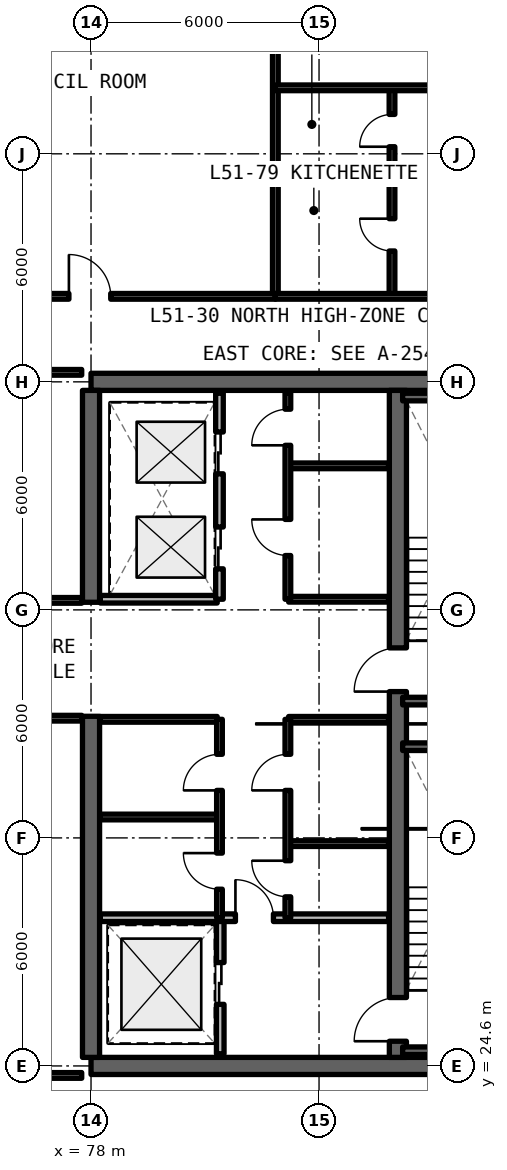
"""IFC4 building model, lengths in metres.
Left out: names, types, materials, properties, quantities, classifications, styles, units other than length and angle.
Written with IfcOpenShell. Run it as: python <this file> out.ifc"""

import sys

from ifc_helpers import new_model, si_unit, direction, frame, frame_2d, origin, place, context, subcontext, project, spatial, rectangle, extrude, element, fill, save


model = new_model("IFC4")
c1 = context("Model", 3, precision=1e-05, world=origin(), true_north=direction((0.0, 1.0)))
c2 = subcontext(c1, "Body", "Model", "MODEL_VIEW")
j1 = project(units=[si_unit("LENGTHUNIT", "METRE"), si_unit("PLANEANGLEUNIT", "RADIAN")], contexts=[c1])
p1 = place(None, origin())
s1 = spatial("IfcSite", under=j1, at=p1, CompositionType="ELEMENT")
p2 = place(p1, origin())
s2 = spatial("IfcBuilding", under=s1, at=p2, CompositionType="ELEMENT")
p3 = place(p2, frame((0.0, 0.0, 185.13)))
s3 = spatial("IfcBuildingStorey", under=s2, at=p3, CompositionType="ELEMENT", Elevation=185.13)
for number, where, z_axis, x_axis in (
    (1, (78.0, 24.6, 0.0), (0.0, 0.0, 1.0), (1.0, 0.0, 0.0)),
    (2, (90.0, 42.6, 0.0), (0.0, 0.0, 1.0), (-1.0, 0.0, 0.0)),
):
    element("IfcWall", number, at=place(p3, frame(where, z_axis=z_axis, x_axis=x_axis)), inside=s3, PredefinedType="SHEAR", context=c2, shape_type="SweptSolid", body=[
        extrude(rectangle(XDim=12.0, YDim=0.45, at=frame_2d((6.0, 0.0))), origin(), (0.0, 0.0, 1.0), 3.3),
    ])
p4 = place(p3, frame((78.0, 24.825, 0.0), z_axis=(0.0, 0.0, 1.0), x_axis=(0.0, 1.0, 0.0)))
e3 = element("IfcWall", 3, at=p4, inside=s3, PredefinedType="SHEAR", context=c2, shape_type="SweptSolid", body=[
    extrude(rectangle(XDim=8.975, YDim=0.45, at=frame_2d((4.488, 0.0))), origin(), (0.0, 0.0, 1.0), 3.3),
])
p5 = place(p3, frame((78.0, 36.8, 0.0), z_axis=(0.0, 0.0, 1.0), x_axis=(0.0, 1.0, 0.0)))
e4 = element("IfcWall", 4, at=p5, inside=s3, PredefinedType="SHEAR", context=c2, shape_type="SweptSolid", body=[
    extrude(rectangle(XDim=5.575, YDim=0.45, at=frame_2d((2.788, 0.0))), origin(), (0.0, 0.0, 1.0), 3.3),
])
p6 = place(p3, frame((86.075, 24.825, 0.0), z_axis=(0.0, 0.0, 1.0), x_axis=(0.0, 1.0, 0.0)))
e5 = element("IfcWall", 5, at=p6, inside=s3, PredefinedType="SHEAR", context=c2, shape_type="SweptSolid", body=[
    extrude(rectangle(XDim=17.55, YDim=0.45, at=frame_2d((8.775, 0.0))), origin(), (0.0, 0.0, 1.0), 3.3),
])
p7 = place(p6, frame((0.425, 0.0, 0.0)))
e6 = element("IfcOpeningElement", 6, at=p7, cuts=e5, PredefinedType="OPENING", context=c2, shape_type="SweptSolid", body=[
    extrude(rectangle(XDim=1.15, YDim=2.15, at=frame_2d((0.575, 1.075))), frame((0.0, 0.235, 0.0), z_axis=(0.0, -1.0, 0.0), x_axis=(1.0, 0.0, 0.0)), (0.0, 0.0, 1.0), 0.47),
])
p8 = place(p6, frame((9.625, 0.0, 0.0)))
e7 = element("IfcOpeningElement", 7, at=p8, cuts=e5, PredefinedType="OPENING", context=c2, shape_type="SweptSolid", body=[
    extrude(rectangle(XDim=1.15, YDim=2.15, at=frame_2d((0.575, 1.075))), frame((0.0, 0.235, 0.0), z_axis=(0.0, -1.0, 0.0), x_axis=(1.0, 0.0, 0.0)), (0.0, 0.0, 1.0), 0.47),
])
p9 = place(p3, frame((81.4, 24.92, 0.0), z_axis=(0.0, 0.0, 1.0), x_axis=(0.0, 1.0, 0.0)))
e8 = element("IfcWall", 8, at=p9, inside=s3, PredefinedType="SOLIDWALL", context=c2, shape_type="SweptSolid", body=[
    extrude(rectangle(XDim=3.58, YDim=0.2, at=frame_2d((1.79, 0.0))), origin(), (0.0, 0.0, 1.0), 2.35),
])
p10 = place(p9, frame((1.3, 0.0, 0.0)))
e9 = element("IfcOpeningElement", 9, at=p10, cuts=e8, PredefinedType="OPENING", context=c2, shape_type="SweptSolid", body=[
    extrude(rectangle(XDim=1.1, YDim=2.2, at=frame_2d((0.55, 1.1))), frame((0.0, 0.11, 0.0), z_axis=(0.0, -1.0, 0.0), x_axis=(1.0, 0.0, 0.0)), (0.0, 0.0, 1.0), 0.22),
])
p11 = place(p3, frame((78.245, 28.5, 0.0), z_axis=(0.0, 0.0, 1.0), x_axis=(1.0, 0.0, 0.0)))
e10 = element("IfcWall", 10, at=p11, inside=s3, PredefinedType="SOLIDWALL", context=c2, shape_type="SweptSolid", body=[
    extrude(rectangle(XDim=7.585, YDim=0.2, at=frame_2d((3.792, 0.0))), origin(), (0.0, 0.0, 1.0), 2.35),
])
p12 = place(p11, frame((3.555, 0.0, 0.0)))
e11 = element("IfcOpeningElement", 11, at=p12, cuts=e10, PredefinedType="OPENING", context=c2, shape_type="SweptSolid", body=[
    extrude(rectangle(XDim=1.0, YDim=2.15, at=frame_2d((0.5, 1.075))), frame((0.0, 0.11, 0.0), z_axis=(0.0, -1.0, 0.0), x_axis=(1.0, 0.0, 0.0)), (0.0, 0.0, 1.0), 0.22),
])
for number, where, z_axis, x_axis in (
    (12, (83.2, 30.45, 0.0), (0.0, 0.0, 1.0), (1.0, 0.0, 0.0)),
    (13, (83.2, 33.72, 0.0), (0.0, 0.0, 1.0), (1.0, 0.0, 0.0)),
):
    element("IfcWall", number, at=place(p3, frame(where, z_axis=z_axis, x_axis=x_axis)), inside=s3, PredefinedType="SOLIDWALL", context=c2, shape_type="SweptSolid", body=[
        extrude(rectangle(XDim=2.63, YDim=0.15, at=frame_2d((1.315, 0.0))), origin(), (0.0, 0.0, 1.0), 2.35),
    ])
p13 = place(p3, frame((83.18, 28.5, 0.0), z_axis=(0.0, 0.0, 1.0), x_axis=(0.0, 1.0, 0.0)))
e14 = element("IfcWall", 14, at=p13, inside=s3, PredefinedType="SOLIDWALL", context=c2, shape_type="SweptSolid", body=[
    extrude(rectangle(XDim=5.22, YDim=0.15, at=frame_2d((2.61, 0.0))), origin(), (0.0, 0.0, 1.0), 2.35),
])
p14 = place(p13, frame((0.55, 0.0, 0.0)))
e15 = element("IfcOpeningElement", 15, at=p14, cuts=e14, PredefinedType="OPENING", context=c2, shape_type="SweptSolid", body=[
    extrude(rectangle(XDim=0.95, YDim=2.15, at=frame_2d((0.475, 1.075))), frame((0.0, 0.085, 0.0), z_axis=(0.0, -1.0, 0.0), x_axis=(1.0, 0.0, 0.0)), (0.0, 0.0, 1.0), 0.17),
])
p15 = place(p13, frame((3.35, 0.0, 0.0)))
e16 = element("IfcOpeningElement", 16, at=p15, cuts=e14, PredefinedType="OPENING", context=c2, shape_type="SweptSolid", body=[
    extrude(rectangle(XDim=0.95, YDim=2.15, at=frame_2d((0.475, 1.075))), frame((0.0, 0.085, 0.0), z_axis=(0.0, -1.0, 0.0), x_axis=(1.0, 0.0, 0.0)), (0.0, 0.0, 1.0), 0.17),
])
for number, where, z_axis, x_axis in (
    (17, (78.245, 31.15, 0.0), (0.0, 0.0, 1.0), (1.0, 0.0, 0.0)),
    (18, (78.245, 33.72, 0.0), (0.0, 0.0, 1.0), (1.0, 0.0, 0.0)),
):
    element("IfcWall", number, at=place(p3, frame(where, z_axis=z_axis, x_axis=x_axis)), inside=s3, PredefinedType="SOLIDWALL", context=c2, shape_type="SweptSolid", body=[
        extrude(rectangle(XDim=3.075, YDim=0.15, at=frame_2d((1.538, 0.0))), origin(), (0.0, 0.0, 1.0), 2.35),
    ])
p16 = place(p3, frame((81.38, 28.5, 0.0), z_axis=(0.0, 0.0, 1.0), x_axis=(0.0, 1.0, 0.0)))
e19 = element("IfcWall", 19, at=p16, inside=s3, PredefinedType="SOLIDWALL", context=c2, shape_type="SweptSolid", body=[
    extrude(rectangle(XDim=5.22, YDim=0.15, at=frame_2d((2.61, 0.0))), origin(), (0.0, 0.0, 1.0), 2.35),
])
p17 = place(p16, frame((0.75, 0.0, 0.0)))
e20 = element("IfcOpeningElement", 20, at=p17, cuts=e19, PredefinedType="OPENING", context=c2, shape_type="SweptSolid", body=[
    extrude(rectangle(XDim=0.95, YDim=2.15, at=frame_2d((0.475, 1.075))), frame((0.0, 0.085, 0.0), z_axis=(0.0, -1.0, 0.0), x_axis=(1.0, 0.0, 0.0)), (0.0, 0.0, 1.0), 0.17),
])
p18 = place(p16, frame((3.35, 0.0, 0.0)))
e21 = element("IfcOpeningElement", 21, at=p18, cuts=e19, PredefinedType="OPENING", context=c2, shape_type="SweptSolid", body=[
    extrude(rectangle(XDim=0.95, YDim=2.15, at=frame_2d((0.475, 1.075))), frame((0.0, 0.085, 0.0), z_axis=(0.0, -1.0, 0.0), x_axis=(1.0, 0.0, 0.0)), (0.0, 0.0, 1.0), 0.17),
])
for number, where, z_axis, x_axis in (
    (22, (83.2, 36.88, 0.0), (0.0, 0.0, 1.0), (1.0, 0.0, 0.0)),
    (23, (83.2, 40.39, 0.0), (0.0, 0.0, 1.0), (1.0, 0.0, 0.0)),
):
    element("IfcWall", number, at=place(p3, frame(where, z_axis=z_axis, x_axis=x_axis)), inside=s3, PredefinedType="SOLIDWALL", context=c2, shape_type="SweptSolid", body=[
        extrude(rectangle(XDim=2.63, YDim=0.15, at=frame_2d((1.315, 0.0))), origin(), (0.0, 0.0, 1.0), 2.35),
    ])
p19 = place(p3, frame((83.18, 36.88, 0.0), z_axis=(0.0, 0.0, 1.0), x_axis=(0.0, 1.0, 0.0)))
e24 = element("IfcWall", 24, at=p19, inside=s3, PredefinedType="SOLIDWALL", context=c2, shape_type="SweptSolid", body=[
    extrude(rectangle(XDim=5.42, YDim=0.15, at=frame_2d((2.71, 0.0))), origin(), (0.0, 0.0, 1.0), 2.35),
])
p20 = place(p19, frame((1.15, 0.0, 0.0)))
e25 = element("IfcOpeningElement", 25, at=p20, cuts=e24, PredefinedType="OPENING", context=c2, shape_type="SweptSolid", body=[
    extrude(rectangle(XDim=0.95, YDim=2.15, at=frame_2d((0.475, 1.075))), frame((0.0, 0.085, 0.0), z_axis=(0.0, -1.0, 0.0), x_axis=(1.0, 0.0, 0.0)), (0.0, 0.0, 1.0), 0.17),
])
p21 = place(p19, frame((4.05, 0.0, 0.0)))
e26 = element("IfcOpeningElement", 26, at=p21, cuts=e24, PredefinedType="OPENING", context=c2, shape_type="SweptSolid", body=[
    extrude(rectangle(XDim=0.95, YDim=2.15, at=frame_2d((0.475, 1.075))), frame((0.0, 0.085, 0.0), z_axis=(0.0, -1.0, 0.0), x_axis=(1.0, 0.0, 0.0)), (0.0, 0.0, 1.0), 0.17),
])
p22 = place(p3, frame((78.245, 36.88, 0.0), z_axis=(0.0, 0.0, 1.0), x_axis=(1.0, 0.0, 0.0)))
e27 = element("IfcWall", 27, at=p22, inside=s3, PredefinedType="SOLIDWALL", context=c2, shape_type="SweptSolid", body=[
    extrude(rectangle(XDim=3.075, YDim=0.2, at=frame_2d((1.538, 0.0))), origin(), (0.0, 0.0, 1.0), 2.35),
])
p23 = place(p3, frame((81.38, 36.88, 0.0), z_axis=(0.0, 0.0, 1.0), x_axis=(0.0, 1.0, 0.0)))
e28 = element("IfcWall", 28, at=p23, inside=s3, PredefinedType="SOLIDWALL", context=c2, shape_type="SweptSolid", body=[
    extrude(rectangle(XDim=5.42, YDim=0.2, at=frame_2d((2.71, 0.0))), origin(), (0.0, 0.0, 1.0), 2.35),
])
p24 = place(p23, frame((0.8, 0.0, 0.0)))
e29 = element("IfcOpeningElement", 29, at=p24, cuts=e28, PredefinedType="OPENING", context=c2, shape_type="SweptSolid", body=[
    extrude(rectangle(XDim=1.1, YDim=2.2, at=frame_2d((0.55, 1.1))), frame((0.0, 0.11, 0.0), z_axis=(0.0, -1.0, 0.0), x_axis=(1.0, 0.0, 0.0)), (0.0, 0.0, 1.0), 0.22),
])
p25 = place(p23, frame((3.3, 0.0, 0.0)))
e30 = element("IfcOpeningElement", 30, at=p25, cuts=e28, PredefinedType="OPENING", context=c2, shape_type="SweptSolid", body=[
    extrude(rectangle(XDim=1.1, YDim=2.2, at=frame_2d((0.55, 1.1))), frame((0.0, 0.11, 0.0), z_axis=(0.0, -1.0, 0.0), x_axis=(1.0, 0.0, 0.0)), (0.0, 0.0, 1.0), 0.22),
])
p26 = place(p3, frame((69.85, 24.35, 0.0), z_axis=(0.0, 0.0, 1.0), x_axis=(1.0, 0.0, 0.0)))
e31 = element("IfcWall", 31, at=p26, inside=s3, PredefinedType="SOLIDWALL", context=c2, shape_type="SweptSolid", body=[
    extrude(rectangle(XDim=7.905, YDim=0.15, at=frame_2d((3.952, 0.0))), origin(), (0.0, 0.0, 1.0), 2.35),
])
p27 = place(p3, frame((69.85, 33.75, 0.0), z_axis=(0.0, 0.0, 1.0), x_axis=(1.0, 0.0, 0.0)))
e32 = element("IfcWall", 32, at=p27, inside=s3, PredefinedType="SOLIDWALL", context=c2, shape_type="SweptSolid", body=[
    extrude(rectangle(XDim=7.905, YDim=0.15, at=frame_2d((3.952, 0.0))), origin(), (0.0, 0.0, 1.0), 2.35),
])
p28 = place(p27, frame((3.478, 0.0, 0.0)))
e33 = element("IfcOpeningElement", 33, at=p28, cuts=e32, PredefinedType="OPENING", context=c2, shape_type="SweptSolid", body=[
    extrude(rectangle(XDim=0.95, YDim=2.15, at=frame_2d((0.475, 1.075))), frame((0.0, 0.085, 0.0), z_axis=(0.0, -1.0, 0.0), x_axis=(1.0, 0.0, 0.0)), (0.0, 0.0, 1.0), 0.17),
])
p29 = place(p3, frame((69.85, 36.85, 0.0), z_axis=(0.0, 0.0, 1.0), x_axis=(1.0, 0.0, 0.0)))
e34 = element("IfcWall", 34, at=p29, inside=s3, PredefinedType="SOLIDWALL", context=c2, shape_type="SweptSolid", body=[
    extrude(rectangle(XDim=7.905, YDim=0.15, at=frame_2d((3.952, 0.0))), origin(), (0.0, 0.0, 1.0), 2.35),
])
p30 = place(p29, frame((3.478, 0.0, 0.0)))
e35 = element("IfcOpeningElement", 35, at=p30, cuts=e34, PredefinedType="OPENING", context=c2, shape_type="SweptSolid", body=[
    extrude(rectangle(XDim=0.95, YDim=2.15, at=frame_2d((0.475, 1.075))), frame((0.0, 0.085, 0.0), z_axis=(0.0, -1.0, 0.0), x_axis=(1.0, 0.0, 0.0)), (0.0, 0.0, 1.0), 0.17),
])
p31 = place(p3, frame((69.85, 42.85, 0.0), z_axis=(0.0, 0.0, 1.0), x_axis=(1.0, 0.0, 0.0)))
e36 = element("IfcWall", 36, at=p31, inside=s3, PredefinedType="SOLIDWALL", context=c2, shape_type="SweptSolid", body=[
    extrude(rectangle(XDim=7.905, YDim=0.15, at=frame_2d((3.952, 0.0))), origin(), (0.0, 0.0, 1.0), 2.35),
])
p32 = place(p3, frame((82.85, 44.85, 0.0), z_axis=(0.0, 0.0, 1.0), x_axis=(0.0, 1.0, 0.0)))
e37 = element("IfcWall", 37, at=p32, inside=s3, PredefinedType="SOLIDWALL", context=c2, shape_type="SweptSolid", body=[
    extrude(rectangle(XDim=10.08, YDim=0.15, at=frame_2d((5.04, 0.0))), origin(), (0.0, 0.0, 1.0), 2.35),
])
p33 = place(p3, frame((73.086, 44.85, 0.0), z_axis=(0.0, 0.0, 1.0), x_axis=(1.0, 0.0, 0.0)))
e38 = element("IfcWall", 38, at=p33, inside=s3, PredefinedType="SOLIDWALL", context=c2, shape_type="SweptSolid", body=[
    extrude(rectangle(XDim=9.765, YDim=0.15, at=frame_2d((4.882, 0.0))), origin(), (0.0, 0.0, 1.0), 2.35),
])
p34 = place(p33, frame((4.333, 0.0, 0.0)))
e39 = element("IfcOpeningElement", 39, at=p34, cuts=e38, PredefinedType="OPENING", context=c2, shape_type="SweptSolid", body=[
    extrude(rectangle(XDim=1.1, YDim=2.15, at=frame_2d((0.55, 1.075))), frame((0.0, 0.085, 0.0), z_axis=(0.0, -1.0, 0.0), x_axis=(1.0, 0.0, 0.0)), (0.0, 0.0, 1.0), 0.17),
])
p35 = place(p3, frame((82.85, 48.087, 0.0), z_axis=(0.0, 0.0, 1.0), x_axis=(1.0, 0.0, 0.0)))
e40 = element("IfcWall", 40, at=p35, inside=s3, PredefinedType="PARTITIONING", context=c2, shape_type="SweptSolid", body=[
    extrude(rectangle(XDim=3.07, YDim=0.15, at=frame_2d((1.535, 0.0))), origin(), (0.0, 0.0, 1.0), 2.35),
])
p36 = place(p3, frame((85.92, 44.85, 0.0), z_axis=(0.0, 0.0, 1.0), x_axis=(0.0, 1.0, 0.0)))
e41 = element("IfcWall", 41, at=p36, inside=s3, PredefinedType="PARTITIONING", context=c2, shape_type="SweptSolid", body=[
    extrude(rectangle(XDim=5.486, YDim=0.15, at=frame_2d((2.743, 0.0))), origin(), (0.0, 0.0, 1.0), 2.35),
])
p37 = place(p36, frame((1.193, 0.0, 0.0)))
e42 = element("IfcOpeningElement", 42, at=p37, cuts=e41, PredefinedType="OPENING", context=c2, shape_type="SweptSolid", body=[
    extrude(rectangle(XDim=0.85, YDim=2.1, at=frame_2d((0.425, 1.05))), frame((0.0, 0.085, 0.0), z_axis=(0.0, -1.0, 0.0), x_axis=(1.0, 0.0, 0.0)), (0.0, 0.0, 1.0), 0.17),
])
p38 = place(p36, frame((3.937, 0.0, 0.0)))
e43 = element("IfcOpeningElement", 43, at=p38, cuts=e41, PredefinedType="OPENING", context=c2, shape_type="SweptSolid", body=[
    extrude(rectangle(XDim=0.85, YDim=2.1, at=frame_2d((0.425, 1.05))), frame((0.0, 0.085, 0.0), z_axis=(0.0, -1.0, 0.0), x_axis=(1.0, 0.0, 0.0)), (0.0, 0.0, 1.0), 0.17),
])
p39 = place(p3, frame((82.85, 50.336, 0.0), z_axis=(0.0, 0.0, 1.0), x_axis=(1.0, 0.0, 0.0)))
e44 = element("IfcWall", 44, at=p39, inside=s3, PredefinedType="PARTITIONING", context=c2, shape_type="SweptSolid", body=[
    extrude(rectangle(XDim=12.35, YDim=0.15, at=frame_2d((6.175, 0.0))), origin(), (0.0, 0.0, 1.0), 2.35),
])
p40 = place(p39, frame((4.321, 0.0, 0.0)))
e45 = element("IfcOpeningElement", 45, at=p40, cuts=e44, PredefinedType="OPENING", context=c2, shape_type="SweptSolid", body=[
    extrude(rectangle(XDim=0.85, YDim=2.1, at=frame_2d((0.425, 1.05))), frame((0.0, 0.085, 0.0), z_axis=(0.0, -1.0, 0.0), x_axis=(1.0, 0.0, 0.0)), (0.0, 0.0, 1.0), 0.17),
])
p41 = place(p39, frame((8.961, 0.0, 0.0)))
e46 = element("IfcOpeningElement", 46, at=p41, cuts=e44, PredefinedType="OPENING", context=c2, shape_type="SweptSolid", body=[
    extrude(rectangle(XDim=0.85, YDim=2.1, at=frame_2d((0.425, 1.05))), frame((0.0, 0.085, 0.0), z_axis=(0.0, -1.0, 0.0), x_axis=(1.0, 0.0, 0.0)), (0.0, 0.0, 1.0), 0.17),
])
p42 = place(p3, frame((82.85, 44.85, 0.0), z_axis=(0.0, 0.0, 1.0), x_axis=(1.0, 0.0, 0.0)))
e47 = element("IfcWall", 47, at=p42, inside=s3, PredefinedType="SOLIDWALL", context=c2, shape_type="SweptSolid", body=[
    extrude(rectangle(XDim=12.35, YDim=0.15, at=frame_2d((6.175, 0.0))), origin(), (0.0, 0.0, 1.0), 2.35),
])
p43 = place(p42, frame((7.275, 0.0, 0.0)))
e48 = element("IfcOpeningElement", 48, at=p43, cuts=e47, PredefinedType="OPENING", context=c2, shape_type="SweptSolid", body=[
    extrude(rectangle(XDim=0.95, YDim=2.15, at=frame_2d((0.475, 1.075))), frame((0.0, 0.085, 0.0), z_axis=(0.0, -1.0, 0.0), x_axis=(1.0, 0.0, 0.0)), (0.0, 0.0, 1.0), 0.17),
])
for number, where, z_axis, x_axis in (
    (49, (86.2, 25.0, 0.0), (0.0, 0.0, 1.0), (1.0, 0.0, 0.0)),
    (50, (89.6, 33.0, 0.0), (0.0, 0.0, 1.0), (-1.0, 0.0, 0.0)),
    (51, (86.2, 34.2, 0.0), (0.0, 0.0, 1.0), (1.0, 0.0, 0.0)),
    (52, (89.6, 42.2, 0.0), (0.0, 0.0, 1.0), (-1.0, 0.0, 0.0)),
):
    element("IfcWall", number, at=place(p3, frame(where, z_axis=z_axis, x_axis=x_axis)), inside=s3, PredefinedType="SOLIDWALL", context=c2, shape_type="SweptSolid", body=[
        extrude(rectangle(XDim=3.4, YDim=0.2, at=frame_2d((1.7, 0.0))), origin(), (0.0, 0.0, 1.0), 3.3),
    ])
p44 = place(p10, origin())
e53 = element("IfcDoor", 53, at=p44, inside=s3, OperationType="SLIDING_TO_LEFT", PredefinedType="DOOR", context=c2, shape_type="SweptSolid", body=[
    extrude(rectangle(XDim=1.1, YDim=2.2, at=frame_2d((0.55, 1.1))), frame((0.0, 0.025, 0.0), z_axis=(0.0, -1.0, 0.0), x_axis=(1.0, 0.0, 0.0)), (0.0, 0.0, 1.0), 0.05),
])
fill(e9, e53)
p45 = place(p12, origin())
e54 = element("IfcDoor", 54, at=p45, inside=s3, OperationType="SINGLE_SWING_LEFT", PredefinedType="DOOR", context=c2, shape_type="SweptSolid", body=[
    extrude(rectangle(XDim=1.0, YDim=2.15, at=frame_2d((0.5, 1.075))), frame((0.0, 0.025, 0.0), z_axis=(0.0, -1.0, 0.0), x_axis=(1.0, 0.0, 0.0)), (0.0, 0.0, 1.0), 0.05),
])
fill(e11, e54)
p46 = place(p14, origin())
e55 = element("IfcDoor", 55, at=p46, inside=s3, OperationType="SINGLE_SWING_RIGHT", PredefinedType="DOOR", context=c2, shape_type="SweptSolid", body=[
    extrude(rectangle(XDim=0.95, YDim=2.15, at=frame_2d((0.475, 1.075))), frame((0.0, 0.025, 0.0), z_axis=(0.0, -1.0, 0.0), x_axis=(1.0, 0.0, 0.0)), (0.0, 0.0, 1.0), 0.05),
])
fill(e15, e55)
p47 = place(p15, origin())
e56 = element("IfcDoor", 56, at=p47, inside=s3, OperationType="SINGLE_SWING_LEFT", PredefinedType="DOOR", context=c2, shape_type="SweptSolid", body=[
    extrude(rectangle(XDim=0.95, YDim=2.15, at=frame_2d((0.475, 1.075))), frame((0.0, 0.025, 0.0), z_axis=(0.0, -1.0, 0.0), x_axis=(1.0, 0.0, 0.0)), (0.0, 0.0, 1.0), 0.05),
])
fill(e16, e56)
p48 = place(p17, origin())
e57 = element("IfcDoor", 57, at=p48, inside=s3, OperationType="SINGLE_SWING_RIGHT", PredefinedType="DOOR", context=c2, shape_type="SweptSolid", body=[
    extrude(rectangle(XDim=0.95, YDim=2.15, at=frame_2d((0.475, 1.075))), frame((0.0, 0.025, 0.0), z_axis=(0.0, -1.0, 0.0), x_axis=(1.0, 0.0, 0.0)), (0.0, 0.0, 1.0), 0.05),
])
fill(e20, e57)
p49 = place(p18, origin())
e58 = element("IfcDoor", 58, at=p49, inside=s3, OperationType="SINGLE_SWING_LEFT", PredefinedType="DOOR", context=c2, shape_type="SweptSolid", body=[
    extrude(rectangle(XDim=0.95, YDim=2.15, at=frame_2d((0.475, 1.075))), frame((0.0, 0.025, 0.0), z_axis=(0.0, -1.0, 0.0), x_axis=(1.0, 0.0, 0.0)), (0.0, 0.0, 1.0), 0.05),
])
fill(e21, e58)
p50 = place(p20, origin())
e59 = element("IfcDoor", 59, at=p50, inside=s3, OperationType="SINGLE_SWING_RIGHT", PredefinedType="DOOR", context=c2, shape_type="SweptSolid", body=[
    extrude(rectangle(XDim=0.95, YDim=2.15, at=frame_2d((0.475, 1.075))), frame((0.0, 0.025, 0.0), z_axis=(0.0, -1.0, 0.0), x_axis=(1.0, 0.0, 0.0)), (0.0, 0.0, 1.0), 0.05),
])
fill(e25, e59)
p51 = place(p21, origin())
e60 = element("IfcDoor", 60, at=p51, inside=s3, OperationType="SINGLE_SWING_LEFT", PredefinedType="DOOR", context=c2, shape_type="SweptSolid", body=[
    extrude(rectangle(XDim=0.95, YDim=2.15, at=frame_2d((0.475, 1.075))), frame((0.0, 0.025, 0.0), z_axis=(0.0, -1.0, 0.0), x_axis=(1.0, 0.0, 0.0)), (0.0, 0.0, 1.0), 0.05),
])
fill(e26, e60)
p52 = place(p24, origin())
e61 = element("IfcDoor", 61, at=p52, inside=s3, OperationType="SLIDING_TO_LEFT", PredefinedType="DOOR", context=c2, shape_type="SweptSolid", body=[
    extrude(rectangle(XDim=1.1, YDim=2.2, at=frame_2d((0.55, 1.1))), frame((0.0, 0.025, 0.0), z_axis=(0.0, -1.0, 0.0), x_axis=(1.0, 0.0, 0.0)), (0.0, 0.0, 1.0), 0.05),
])
fill(e29, e61)
p53 = place(p25, origin())
e62 = element("IfcDoor", 62, at=p53, inside=s3, OperationType="SLIDING_TO_RIGHT", PredefinedType="DOOR", context=c2, shape_type="SweptSolid", body=[
    extrude(rectangle(XDim=1.1, YDim=2.2, at=frame_2d((0.55, 1.1))), frame((0.0, 0.025, 0.0), z_axis=(0.0, -1.0, 0.0), x_axis=(1.0, 0.0, 0.0)), (0.0, 0.0, 1.0), 0.05),
])
fill(e30, e62)
p54 = place(p34, origin())
e63 = element("IfcDoor", 63, at=p54, inside=s3, OperationType="SINGLE_SWING_LEFT", PredefinedType="DOOR", context=c2, shape_type="SweptSolid", body=[
    extrude(rectangle(XDim=1.1, YDim=2.15, at=frame_2d((0.55, 1.075))), frame((0.0, 0.025, 0.0), z_axis=(0.0, -1.0, 0.0), x_axis=(1.0, 0.0, 0.0)), (0.0, 0.0, 1.0), 0.05),
])
fill(e39, e63)
p55 = place(p37, origin())
e64 = element("IfcDoor", 64, at=p55, inside=s3, OperationType="SINGLE_SWING_RIGHT", PredefinedType="DOOR", context=c2, shape_type="SweptSolid", body=[
    extrude(rectangle(XDim=0.85, YDim=2.1, at=frame_2d((0.425, 1.05))), frame((0.0, 0.025, 0.0), z_axis=(0.0, -1.0, 0.0), x_axis=(1.0, 0.0, 0.0)), (0.0, 0.0, 1.0), 0.05),
])
fill(e42, e64)
p56 = place(p38, origin())
e65 = element("IfcDoor", 65, at=p56, inside=s3, OperationType="SINGLE_SWING_LEFT", PredefinedType="DOOR", context=c2, shape_type="SweptSolid", body=[
    extrude(rectangle(XDim=0.85, YDim=2.1, at=frame_2d((0.425, 1.05))), frame((0.0, 0.025, 0.0), z_axis=(0.0, -1.0, 0.0), x_axis=(1.0, 0.0, 0.0)), (0.0, 0.0, 1.0), 0.05),
])
fill(e43, e65)
p57 = place(p7, origin())
e66 = element("IfcDoor", 66, at=p57, inside=s3, OperationType="SINGLE_SWING_LEFT", PredefinedType="DOOR", context=c2, shape_type="SweptSolid", body=[
    extrude(rectangle(XDim=1.15, YDim=2.15, at=frame_2d((0.575, 1.075))), frame((0.0, 0.025, 0.0), z_axis=(0.0, -1.0, 0.0), x_axis=(1.0, 0.0, 0.0)), (0.0, 0.0, 1.0), 0.05),
])
fill(e6, e66)
p58 = place(p8, origin())
e67 = element("IfcDoor", 67, at=p58, inside=s3, OperationType="SINGLE_SWING_RIGHT", PredefinedType="DOOR", context=c2, shape_type="SweptSolid", body=[
    extrude(rectangle(XDim=1.15, YDim=2.15, at=frame_2d((0.575, 1.075))), frame((0.0, 0.025, 0.0), z_axis=(0.0, -1.0, 0.0), x_axis=(1.0, 0.0, 0.0)), (0.0, 0.0, 1.0), 0.05),
])
fill(e7, e67)
save(model, sys.argv[1])
